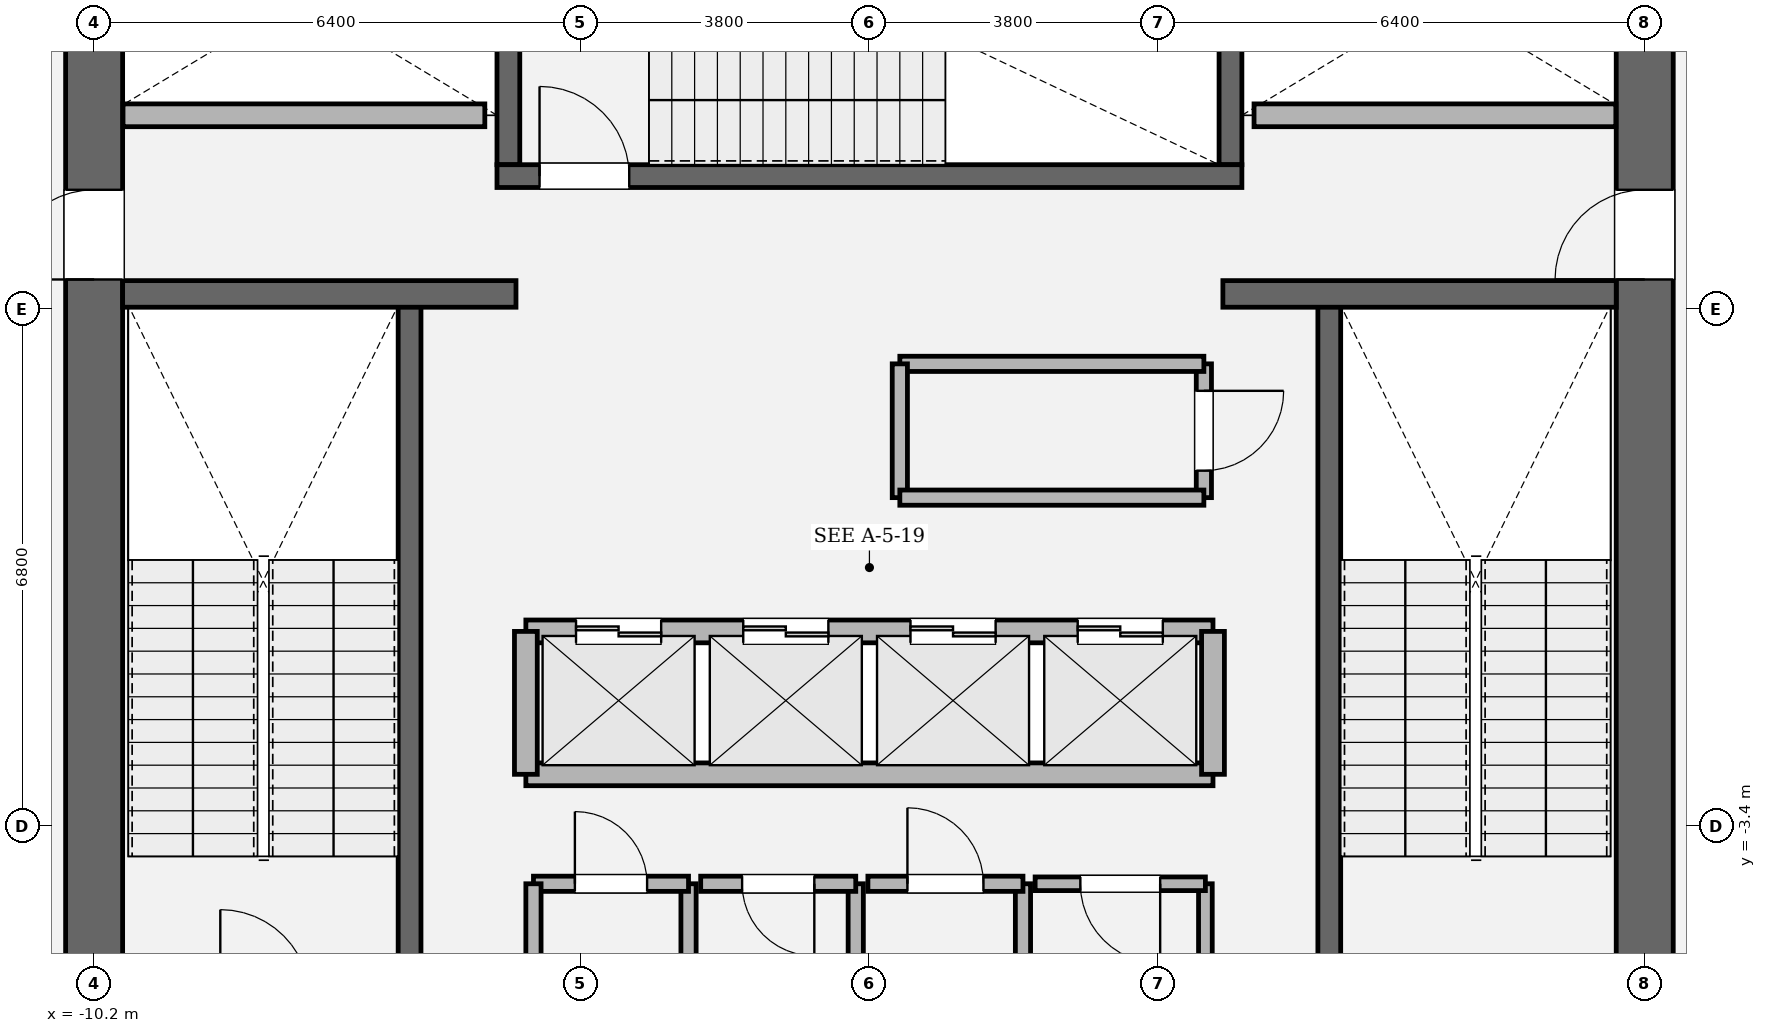
"""IFC4 building model, lengths in metres.
Left out: names, types, materials, properties, quantities, classifications, styles, units other than length and angle.
Written with IfcOpenShell. Run it as: python <this file> out.ifc"""

import sys

from ifc_helpers import new_model, si_unit, direction, frame, frame_2d, origin, place, context, subcontext, project, spatial, rectangle, extrude, element, fill, save


model = new_model("IFC4")
c1 = context("Model", 3, precision=1e-05, world=origin(), true_north=direction((0.0, 1.0)))
c2 = subcontext(c1, "Body", "Model", "MODEL_VIEW")
j1 = project(units=[si_unit("LENGTHUNIT", "METRE"), si_unit("PLANEANGLEUNIT", "RADIAN")], contexts=[c1])
p1 = place(None, origin())
s1 = spatial("IfcSite", under=j1, at=p1, CompositionType="ELEMENT")
p2 = place(p1, origin())
s2 = spatial("IfcBuilding", under=s1, at=p2, CompositionType="ELEMENT")
p3 = place(p2, frame((0.0, 0.0, 88.95)))
s3 = spatial("IfcBuildingStorey", under=s2, at=p3, CompositionType="ELEMENT", Elevation=88.95)
p4 = place(p3, frame((-10.2, -8.825, 0.0), z_axis=(0.0, 0.0, 1.0), x_axis=(0.0, 1.0, 0.0)))
e1 = element("IfcWall", 1, at=p4, inside=s3, PredefinedType="SHEAR", context=c2, shape_type="SweptSolid", body=[
    extrude(rectangle(XDim=17.65, YDim=0.75, at=frame_2d((8.825, 0.0))), origin(), (0.0, 0.0, 1.0), 4.05),
])
p5 = place(p4, frame((12.615, 0.0, 0.0)))
e2 = element("IfcOpeningElement", 2, at=p5, cuts=e1, PredefinedType="OPENING", context=c2, shape_type="SweptSolid", body=[
    extrude(rectangle(XDim=1.18, YDim=2.2, at=frame_2d((0.59, 1.1))), frame((0.0, 0.385, 0.0), z_axis=(0.0, -1.0, 0.0), x_axis=(1.0, 0.0, 0.0)), (0.0, 0.0, 1.0), 0.77),
])
p6 = place(p3, frame((10.2, 8.825, 0.0), z_axis=(0.0, 0.0, 1.0), x_axis=(0.0, -1.0, 0.0)))
e3 = element("IfcWall", 3, at=p6, inside=s3, PredefinedType="SHEAR", context=c2, shape_type="SweptSolid", body=[
    extrude(rectangle(XDim=17.65, YDim=0.75, at=frame_2d((8.825, 0.0))), origin(), (0.0, 0.0, 1.0), 4.05),
])
p7 = place(p6, frame((3.855, 0.0, 0.0)))
e4 = element("IfcOpeningElement", 4, at=p7, cuts=e3, PredefinedType="OPENING", context=c2, shape_type="SweptSolid", body=[
    extrude(rectangle(XDim=1.18, YDim=2.2, at=frame_2d((0.59, 1.1))), frame((0.0, 0.385, 0.0), z_axis=(0.0, -1.0, 0.0), x_axis=(1.0, 0.0, 0.0)), (0.0, 0.0, 1.0), 0.77),
])
for number, where, z_axis, x_axis in (
    (5, (-6.05, -5.5, 0.0), (0.0, 0.0, 1.0), (0.0, 1.0, 0.0)),
    (6, (6.05, 3.45, 0.0), (0.0, 0.0, 1.0), (0.0, -1.0, 0.0)),
):
    element("IfcWall", number, at=place(p3, frame(where, z_axis=z_axis, x_axis=x_axis)), inside=s3, PredefinedType="SOLIDWALL", context=c2, shape_type="SweptSolid", body=[
        extrude(rectangle(XDim=8.95, YDim=0.3, at=frame_2d((4.475, 0.0))), origin(), (0.0, 0.0, 1.0), 4.05),
    ])
for number, where, z_axis, x_axis in (
    (7, (-4.75, 5.3, 0.0), (0.0, 0.0, 1.0), (0.0, 1.0, 0.0)),
    (8, (4.75, 8.825, 0.0), (0.0, 0.0, 1.0), (0.0, -1.0, 0.0)),
):
    element("IfcWall", number, at=place(p3, frame(where, z_axis=z_axis, x_axis=x_axis)), inside=s3, PredefinedType="SOLIDWALL", context=c2, shape_type="SweptSolid", body=[
        extrude(rectangle(XDim=3.525, YDim=0.3, at=frame_2d((1.762, 0.0))), origin(), (0.0, 0.0, 1.0), 4.05),
    ])
p8 = place(p3, frame((-4.9, 5.15, 0.0), z_axis=(0.0, 0.0, 1.0), x_axis=(1.0, 0.0, 0.0)))
e9 = element("IfcWall", 9, at=p8, inside=s3, PredefinedType="SOLIDWALL", context=c2, shape_type="SweptSolid", body=[
    extrude(rectangle(XDim=9.8, YDim=0.3, at=frame_2d((4.9, 0.0))), origin(), (0.0, 0.0, 1.0), 4.05),
])
p9 = place(p8, frame((0.56, 0.0, 0.0)))
e10 = element("IfcOpeningElement", 10, at=p9, cuts=e9, PredefinedType="OPENING", context=c2, shape_type="SweptSolid", body=[
    extrude(rectangle(XDim=1.18, YDim=2.2, at=frame_2d((0.59, 1.1))), frame((0.0, 0.16, 0.0), z_axis=(0.0, -1.0, 0.0), x_axis=(1.0, 0.0, 0.0)), (0.0, 0.0, 1.0), 0.32),
])
for number, where, z_axis, x_axis in (
    (11, (-9.825, 3.6, 0.0), (0.0, 0.0, 1.0), (1.0, 0.0, 0.0)),
    (12, (4.65, 3.6, 0.0), (0.0, 0.0, 1.0), (1.0, 0.0, 0.0)),
):
    element("IfcWall", number, at=place(p3, frame(where, z_axis=z_axis, x_axis=x_axis)), inside=s3, PredefinedType="SOLIDWALL", context=c2, shape_type="SweptSolid", body=[
        extrude(rectangle(XDim=5.175, YDim=0.35, at=frame_2d((2.587, 0.0))), origin(), (0.0, 0.0, 1.0), 4.05),
    ])
p10 = place(p3, frame((-4.52, -0.84, 0.0), z_axis=(0.0, 0.0, 1.0), x_axis=(1.0, 0.0, 0.0)))
e13 = element("IfcWall", 13, at=p10, inside=s3, PredefinedType="SOLIDWALL", context=c2, shape_type="SweptSolid", body=[
    extrude(rectangle(XDim=9.04, YDim=0.3, at=frame_2d((4.52, 0.0))), origin(), (0.0, 0.0, 1.0), 3.77),
])
p11 = place(p10, frame((0.66, 0.0, 0.0)))
e14 = element("IfcOpeningElement", 14, at=p11, cuts=e13, PredefinedType="OPENING", context=c2, shape_type="SweptSolid", body=[
    extrude(rectangle(XDim=1.12, YDim=2.25, at=frame_2d((0.56, 1.125))), frame((0.0, 0.16, 0.0), z_axis=(0.0, -1.0, 0.0), x_axis=(1.0, 0.0, 0.0)), (0.0, 0.0, 1.0), 0.32),
])
p12 = place(p10, frame((2.86, 0.0, 0.0)))
e15 = element("IfcOpeningElement", 15, at=p12, cuts=e13, PredefinedType="OPENING", context=c2, shape_type="SweptSolid", body=[
    extrude(rectangle(XDim=1.12, YDim=2.25, at=frame_2d((0.56, 1.125))), frame((0.0, 0.16, 0.0), z_axis=(0.0, -1.0, 0.0), x_axis=(1.0, 0.0, 0.0)), (0.0, 0.0, 1.0), 0.32),
])
p13 = place(p10, frame((5.06, 0.0, 0.0)))
e16 = element("IfcOpeningElement", 16, at=p13, cuts=e13, PredefinedType="OPENING", context=c2, shape_type="SweptSolid", body=[
    extrude(rectangle(XDim=1.12, YDim=2.25, at=frame_2d((0.56, 1.125))), frame((0.0, 0.16, 0.0), z_axis=(0.0, -1.0, 0.0), x_axis=(1.0, 0.0, 0.0)), (0.0, 0.0, 1.0), 0.32),
])
p14 = place(p10, frame((7.26, 0.0, 0.0)))
e17 = element("IfcOpeningElement", 17, at=p14, cuts=e13, PredefinedType="OPENING", context=c2, shape_type="SweptSolid", body=[
    extrude(rectangle(XDim=1.12, YDim=2.25, at=frame_2d((0.56, 1.125))), frame((0.0, 0.16, 0.0), z_axis=(0.0, -1.0, 0.0), x_axis=(1.0, 0.0, 0.0)), (0.0, 0.0, 1.0), 0.32),
])
p15 = place(p3, frame((-4.52, -2.72, 0.0), z_axis=(0.0, 0.0, 1.0), x_axis=(1.0, 0.0, 0.0)))
e18 = element("IfcWall", 18, at=p15, inside=s3, PredefinedType="SOLIDWALL", context=c2, shape_type="SweptSolid", body=[
    extrude(rectangle(XDim=9.04, YDim=0.3, at=frame_2d((4.52, 0.0))), origin(), (0.0, 0.0, 1.0), 3.77),
])
for number, where, z_axis, x_axis in (
    (19, (-4.52, -2.72, 0.0), (0.0, 0.0, 1.0), (0.0, 1.0, 0.0)),
    (20, (4.52, -2.72, 0.0), (0.0, 0.0, 1.0), (0.0, 1.0, 0.0)),
):
    element("IfcWall", number, at=place(p3, frame(where, z_axis=z_axis, x_axis=x_axis)), inside=s3, PredefinedType="SOLIDWALL", context=c2, shape_type="SweptSolid", body=[
        extrude(rectangle(XDim=1.88, YDim=0.3, at=frame_2d((0.94, 0.0))), origin(), (0.0, 0.0, 1.0), 3.77),
    ])
for number, where, z_axis, x_axis in (
    (21, (-9.82, 5.95, 0.0), (0.0, 0.0, 1.0), (1.0, 0.0, 0.0)),
    (22, (5.06, 5.95, 0.0), (0.0, 0.0, 1.0), (1.0, 0.0, 0.0)),
):
    element("IfcWall", number, at=place(p3, frame(where, z_axis=z_axis, x_axis=x_axis)), inside=s3, PredefinedType="SOLIDWALL", context=c2, shape_type="SweptSolid", body=[
        extrude(rectangle(XDim=4.76, YDim=0.3, at=frame_2d((2.38, 0.0))), origin(), (0.0, 0.0, 1.0), 3.77),
    ])
p16 = place(p3, frame((-2.38, -5.9, 0.0), z_axis=(0.0, 0.0, 1.0), x_axis=(0.0, 1.0, 0.0)))
e23 = element("IfcWall", 23, at=p16, inside=s3, PredefinedType="SOLIDWALL", context=c2, shape_type="SweptSolid", body=[
    extrude(rectangle(XDim=1.74, YDim=0.2, at=frame_2d((0.87, 0.0))), origin(), (0.0, 0.0, 1.0), 3.77),
])
p17 = place(p3, frame((-2.38, -4.16, 0.0), z_axis=(0.0, 0.0, 1.0), x_axis=(-1.0, 0.0, 0.0)))
e24 = element("IfcWall", 24, at=p17, inside=s3, PredefinedType="SOLIDWALL", context=c2, shape_type="SweptSolid", body=[
    extrude(rectangle(XDim=2.04, YDim=0.2, at=frame_2d((1.02, 0.0))), origin(), (0.0, 0.0, 1.0), 3.77),
])
p18 = place(p17, frame((0.545, 0.0, 0.0)))
e25 = element("IfcOpeningElement", 25, at=p18, cuts=e24, PredefinedType="OPENING", context=c2, shape_type="SweptSolid", body=[
    extrude(rectangle(XDim=0.95, YDim=2.15, at=frame_2d((0.475, 1.075))), frame((0.0, 0.11, 0.0), z_axis=(0.0, -1.0, 0.0), x_axis=(1.0, 0.0, 0.0)), (0.0, 0.0, 1.0), 0.22),
])
for number, where, z_axis, x_axis in (
    (26, (-4.42, -4.16, 0.0), (0.0, 0.0, 1.0), (0.0, -1.0, 0.0)),
    (27, (-0.18, -5.9, 0.0), (0.0, 0.0, 1.0), (0.0, 1.0, 0.0)),
):
    element("IfcWall", number, at=place(p3, frame(where, z_axis=z_axis, x_axis=x_axis)), inside=s3, PredefinedType="SOLIDWALL", context=c2, shape_type="SweptSolid", body=[
        extrude(rectangle(XDim=1.74, YDim=0.2, at=frame_2d((0.87, 0.0))), origin(), (0.0, 0.0, 1.0), 3.77),
    ])
p19 = place(p3, frame((-0.18, -4.16, 0.0), z_axis=(0.0, 0.0, 1.0), x_axis=(-1.0, 0.0, 0.0)))
e28 = element("IfcWall", 28, at=p19, inside=s3, PredefinedType="SOLIDWALL", context=c2, shape_type="SweptSolid", body=[
    extrude(rectangle(XDim=2.04, YDim=0.2, at=frame_2d((1.02, 0.0))), origin(), (0.0, 0.0, 1.0), 3.77),
])
p20 = place(p19, frame((0.545, 0.0, 0.0)))
e29 = element("IfcOpeningElement", 29, at=p20, cuts=e28, PredefinedType="OPENING", context=c2, shape_type="SweptSolid", body=[
    extrude(rectangle(XDim=0.95, YDim=2.15, at=frame_2d((0.475, 1.075))), frame((0.0, 0.11, 0.0), z_axis=(0.0, -1.0, 0.0), x_axis=(1.0, 0.0, 0.0)), (0.0, 0.0, 1.0), 0.22),
])
p21 = place(p3, frame((2.02, -5.9, 0.0), z_axis=(0.0, 0.0, 1.0), x_axis=(0.0, 1.0, 0.0)))
e30 = element("IfcWall", 30, at=p21, inside=s3, PredefinedType="SOLIDWALL", context=c2, shape_type="SweptSolid", body=[
    extrude(rectangle(XDim=1.74, YDim=0.2, at=frame_2d((0.87, 0.0))), origin(), (0.0, 0.0, 1.0), 3.77),
])
p22 = place(p3, frame((2.02, -4.16, 0.0), z_axis=(0.0, 0.0, 1.0), x_axis=(-1.0, 0.0, 0.0)))
e31 = element("IfcWall", 31, at=p22, inside=s3, PredefinedType="SOLIDWALL", context=c2, shape_type="SweptSolid", body=[
    extrude(rectangle(XDim=2.04, YDim=0.2, at=frame_2d((1.02, 0.0))), origin(), (0.0, 0.0, 1.0), 3.77),
])
p23 = place(p22, frame((0.52, 0.0, 0.0)))
e32 = element("IfcOpeningElement", 32, at=p23, cuts=e31, PredefinedType="OPENING", context=c2, shape_type="SweptSolid", body=[
    extrude(rectangle(XDim=1.0, YDim=2.15, at=frame_2d((0.5, 1.075))), frame((0.0, 0.11, 0.0), z_axis=(0.0, -1.0, 0.0), x_axis=(1.0, 0.0, 0.0)), (0.0, 0.0, 1.0), 0.22),
])
p24 = place(p3, frame((4.42, -5.9, 0.0), z_axis=(0.0, 0.0, 1.0), x_axis=(0.0, 1.0, 0.0)))
e33 = element("IfcWall", 33, at=p24, inside=s3, PredefinedType="PARTITIONING", context=c2, shape_type="SweptSolid", body=[
    extrude(rectangle(XDim=1.74, YDim=0.18, at=frame_2d((0.87, 0.0))), origin(), (0.0, 0.0, 1.0), 3.77),
])
p25 = place(p3, frame((4.42, -4.16, 0.0), z_axis=(0.0, 0.0, 1.0), x_axis=(-1.0, 0.0, 0.0)))
e34 = element("IfcWall", 34, at=p25, inside=s3, PredefinedType="PARTITIONING", context=c2, shape_type="SweptSolid", body=[
    extrude(rectangle(XDim=2.24, YDim=0.18, at=frame_2d((1.12, 0.0))), origin(), (0.0, 0.0, 1.0), 3.77),
])
p26 = place(p25, frame((0.595, 0.0, 0.0)))
e35 = element("IfcOpeningElement", 35, at=p26, cuts=e34, PredefinedType="OPENING", context=c2, shape_type="SweptSolid", body=[
    extrude(rectangle(XDim=1.05, YDim=2.2, at=frame_2d((0.525, 1.1))), frame((0.0, 0.1, 0.0), z_axis=(0.0, -1.0, 0.0), x_axis=(1.0, 0.0, 0.0)), (0.0, 0.0, 1.0), 0.2),
])
p27 = place(p3, frame((4.4, 0.92, 0.0), z_axis=(0.0, 0.0, 1.0), x_axis=(0.0, 1.0, 0.0)))
e36 = element("IfcWall", 36, at=p27, inside=s3, PredefinedType="SOLIDWALL", context=c2, shape_type="SweptSolid", body=[
    extrude(rectangle(XDim=1.76, YDim=0.2, at=frame_2d((0.88, 0.0))), origin(), (0.0, 0.0, 1.0), 3.77),
])
p28 = place(p27, frame((0.355, 0.0, 0.0)))
e37 = element("IfcOpeningElement", 37, at=p28, cuts=e36, PredefinedType="OPENING", context=c2, shape_type="SweptSolid", body=[
    extrude(rectangle(XDim=1.05, YDim=2.2, at=frame_2d((0.525, 1.1))), frame((0.0, 0.11, 0.0), z_axis=(0.0, -1.0, 0.0), x_axis=(1.0, 0.0, 0.0)), (0.0, 0.0, 1.0), 0.22),
])
p29 = place(p3, frame((4.4, 2.68, 0.0), z_axis=(0.0, 0.0, 1.0), x_axis=(-1.0, 0.0, 0.0)))
e38 = element("IfcWall", 38, at=p29, inside=s3, PredefinedType="SOLIDWALL", context=c2, shape_type="SweptSolid", body=[
    extrude(rectangle(XDim=4.0, YDim=0.2, at=frame_2d((2.0, 0.0))), origin(), (0.0, 0.0, 1.0), 3.77),
])
p30 = place(p3, frame((0.4, 2.68, 0.0), z_axis=(0.0, 0.0, 1.0), x_axis=(0.0, -1.0, 0.0)))
e39 = element("IfcWall", 39, at=p30, inside=s3, PredefinedType="SOLIDWALL", context=c2, shape_type="SweptSolid", body=[
    extrude(rectangle(XDim=1.76, YDim=0.2, at=frame_2d((0.88, 0.0))), origin(), (0.0, 0.0, 1.0), 3.77),
])
p31 = place(p3, frame((0.4, 0.92, 0.0), z_axis=(0.0, 0.0, 1.0), x_axis=(1.0, 0.0, 0.0)))
e40 = element("IfcWall", 40, at=p31, inside=s3, PredefinedType="SOLIDWALL", context=c2, shape_type="SweptSolid", body=[
    extrude(rectangle(XDim=4.0, YDim=0.2, at=frame_2d((2.0, 0.0))), origin(), (0.0, 0.0, 1.0), 3.77),
])
p32 = place(p9, origin())
e41 = element("IfcDoor", 41, at=p32, inside=s3, OperationType="SINGLE_SWING_LEFT", PredefinedType="DOOR", context=c2, shape_type="SweptSolid", body=[
    extrude(rectangle(XDim=1.18, YDim=2.2, at=frame_2d((0.59, 1.1))), frame((0.0, 0.025, 0.0), z_axis=(0.0, -1.0, 0.0), x_axis=(1.0, 0.0, 0.0)), (0.0, 0.0, 1.0), 0.05),
])
fill(e10, e41)
p33 = place(p5, origin())
e42 = element("IfcDoor", 42, at=p33, inside=s3, OperationType="SINGLE_SWING_LEFT", PredefinedType="DOOR", context=c2, shape_type="SweptSolid", body=[
    extrude(rectangle(XDim=1.18, YDim=2.2, at=frame_2d((0.59, 1.1))), frame((0.0, 0.025, 0.0), z_axis=(0.0, -1.0, 0.0), x_axis=(1.0, 0.0, 0.0)), (0.0, 0.0, 1.0), 0.05),
])
fill(e2, e42)
p34 = place(p7, origin())
e43 = element("IfcDoor", 43, at=p34, inside=s3, OperationType="SINGLE_SWING_RIGHT", PredefinedType="DOOR", context=c2, shape_type="SweptSolid", body=[
    extrude(rectangle(XDim=1.18, YDim=2.2, at=frame_2d((0.59, 1.1))), frame((0.0, 0.025, 0.0), z_axis=(0.0, -1.0, 0.0), x_axis=(1.0, 0.0, 0.0)), (0.0, 0.0, 1.0), 0.05),
])
fill(e4, e43)
p35 = place(p11, origin())
e44 = element("IfcDoor", 44, at=p35, inside=s3, OperationType="DOUBLE_DOOR_SLIDING", PredefinedType="DOOR", context=c2, shape_type="SweptSolid", body=[
    extrude(rectangle(XDim=1.12, YDim=2.25, at=frame_2d((0.56, 1.125))), frame((0.0, 0.025, 0.0), z_axis=(0.0, -1.0, 0.0), x_axis=(1.0, 0.0, 0.0)), (0.0, 0.0, 1.0), 0.05),
])
fill(e14, e44)
p36 = place(p12, origin())
e45 = element("IfcDoor", 45, at=p36, inside=s3, OperationType="DOUBLE_DOOR_SLIDING", PredefinedType="DOOR", context=c2, shape_type="SweptSolid", body=[
    extrude(rectangle(XDim=1.12, YDim=2.25, at=frame_2d((0.56, 1.125))), frame((0.0, 0.025, 0.0), z_axis=(0.0, -1.0, 0.0), x_axis=(1.0, 0.0, 0.0)), (0.0, 0.0, 1.0), 0.05),
])
fill(e15, e45)
p37 = place(p13, origin())
e46 = element("IfcDoor", 46, at=p37, inside=s3, OperationType="DOUBLE_DOOR_SLIDING", PredefinedType="DOOR", context=c2, shape_type="SweptSolid", body=[
    extrude(rectangle(XDim=1.12, YDim=2.25, at=frame_2d((0.56, 1.125))), frame((0.0, 0.025, 0.0), z_axis=(0.0, -1.0, 0.0), x_axis=(1.0, 0.0, 0.0)), (0.0, 0.0, 1.0), 0.05),
])
fill(e16, e46)
p38 = place(p14, origin())
e47 = element("IfcDoor", 47, at=p38, inside=s3, OperationType="DOUBLE_DOOR_SLIDING", PredefinedType="DOOR", context=c2, shape_type="SweptSolid", body=[
    extrude(rectangle(XDim=1.12, YDim=2.25, at=frame_2d((0.56, 1.125))), frame((0.0, 0.025, 0.0), z_axis=(0.0, -1.0, 0.0), x_axis=(1.0, 0.0, 0.0)), (0.0, 0.0, 1.0), 0.05),
])
fill(e17, e47)
p39 = place(p18, origin())
e48 = element("IfcDoor", 48, at=p39, inside=s3, OperationType="SINGLE_SWING_RIGHT", PredefinedType="DOOR", context=c2, shape_type="SweptSolid", body=[
    extrude(rectangle(XDim=0.95, YDim=2.15, at=frame_2d((0.475, 1.075))), frame((0.0, 0.025, 0.0), z_axis=(0.0, -1.0, 0.0), x_axis=(1.0, 0.0, 0.0)), (0.0, 0.0, 1.0), 0.05),
])
fill(e25, e48)
p40 = place(p20, origin())
e49 = element("IfcDoor", 49, at=p40, inside=s3, OperationType="SINGLE_SWING_LEFT", PredefinedType="DOOR", context=c2, shape_type="SweptSolid", body=[
    extrude(rectangle(XDim=0.95, YDim=2.15, at=frame_2d((0.475, 1.075))), frame((0.0, 0.025, 0.0), z_axis=(0.0, -1.0, 0.0), x_axis=(1.0, 0.0, 0.0)), (0.0, 0.0, 1.0), 0.05),
])
fill(e29, e49)
p41 = place(p23, origin())
e50 = element("IfcDoor", 50, at=p41, inside=s3, OperationType="SINGLE_SWING_RIGHT", PredefinedType="DOOR", context=c2, shape_type="SweptSolid", body=[
    extrude(rectangle(XDim=1.0, YDim=2.15, at=frame_2d((0.5, 1.075))), frame((0.0, 0.025, 0.0), z_axis=(0.0, -1.0, 0.0), x_axis=(1.0, 0.0, 0.0)), (0.0, 0.0, 1.0), 0.05),
])
fill(e32, e50)
p42 = place(p26, origin())
e51 = element("IfcDoor", 51, at=p42, inside=s3, OperationType="SINGLE_SWING_LEFT", PredefinedType="DOOR", context=c2, shape_type="SweptSolid", body=[
    extrude(rectangle(XDim=1.05, YDim=2.2, at=frame_2d((0.525, 1.1))), frame((0.0, 0.025, 0.0), z_axis=(0.0, -1.0, 0.0), x_axis=(1.0, 0.0, 0.0)), (0.0, 0.0, 1.0), 0.05),
])
fill(e35, e51)
p43 = place(p28, origin())
e52 = element("IfcDoor", 52, at=p43, inside=s3, OperationType="SINGLE_SWING_RIGHT", PredefinedType="DOOR", context=c2, shape_type="SweptSolid", body=[
    extrude(rectangle(XDim=1.05, YDim=2.2, at=frame_2d((0.525, 1.1))), frame((0.0, 0.025, 0.0), z_axis=(0.0, -1.0, 0.0), x_axis=(1.0, 0.0, 0.0)), (0.0, 0.0, 1.0), 0.05),
])
fill(e37, e52)
save(model, sys.argv[1])
